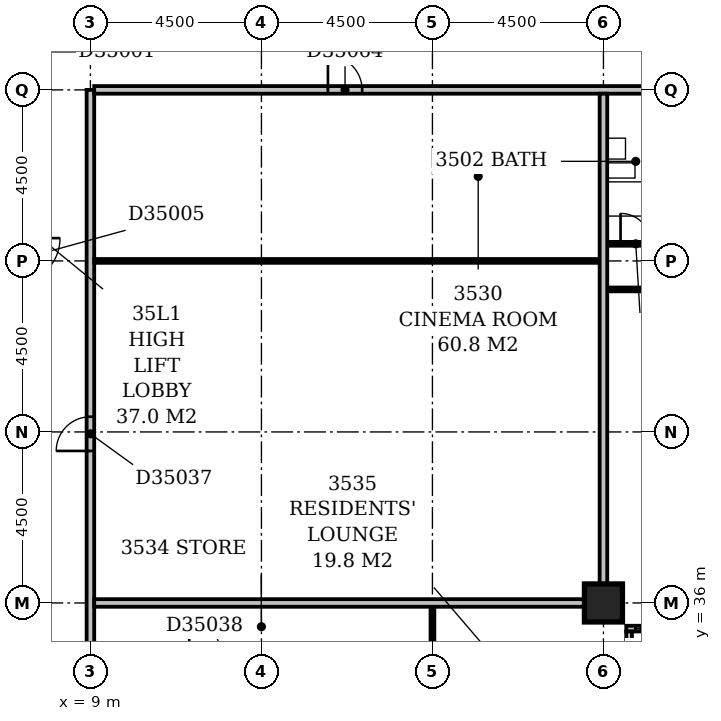
"""IFC4 building model, lengths in metres.
Left out: names, types, materials, properties, quantities, classifications, styles, units other than length and angle.
Written with IfcOpenShell. Run it as: python <this file> out.ifc"""

import sys

from ifc_helpers import new_model, si_unit, direction, frame, frame_2d, origin, origin_2d, place, context, subcontext, project, spatial, rectangle, extrude, element, fill, save


model = new_model("IFC4")
c1 = context("Model", 3, precision=1e-05, world=origin(), true_north=direction((0.0, 1.0)))
c2 = subcontext(c1, "Body", "Model", "MODEL_VIEW")
j1 = project(units=[si_unit("LENGTHUNIT", "METRE"), si_unit("PLANEANGLEUNIT", "RADIAN")], contexts=[c1])
p1 = place(None, origin())
s1 = spatial("IfcSite", under=j1, at=p1, CompositionType="ELEMENT")
p2 = place(p1, origin())
s2 = spatial("IfcBuilding", under=s1, at=p2, CompositionType="ELEMENT")
p3 = place(p2, frame((0.0, 0.0, 141.2)))
s3 = spatial("IfcBuildingStorey", under=s2, at=p3, CompositionType="ELEMENT", Elevation=141.2)
p4 = place(p3, frame((22.5, 36.0, -0.3), z_axis=(0.0, 0.0, 1.0), x_axis=(1.0, 0.0, 0.0)))
e1 = element("IfcColumn", 1, at=p4, inside=s3, PredefinedType="COLUMN", context=c2, shape_type="SweptSolid", body=[
    extrude(rectangle(XDim=1.0, YDim=1.0, at=origin_2d()), origin(), (0.0, 0.0, 1.0), 3.6),
])
p5 = place(p3, frame((23.175, 17.4, 0.0), z_axis=(0.0, 0.0, 1.0), x_axis=(0.0, 1.0, 0.0)))
e2 = element("IfcWall", 2, at=p5, inside=s3, PredefinedType="STANDARD", context=c2, shape_type="SweptSolid", body=[
    extrude(rectangle(XDim=17.85, YDim=0.15, at=frame_2d((8.925, 0.0))), origin(), (0.0, 0.0, 1.0), 2.7),
])
p6 = place(p5, frame((3.397, 0.0, 0.6)))
e3 = element("IfcOpeningElement", 3, at=p6, cuts=e2, PredefinedType="OPENING", context=c2, shape_type="SweptSolid", body=[
    extrude(rectangle(XDim=0.9, YDim=1.8, at=frame_2d((0.45, 0.9))), frame((0.0, 0.087, 0.0), z_axis=(0.0, -1.0, 0.0), x_axis=(1.0, 0.0, 0.0)), (0.0, 0.0, 1.0), 0.174),
])
p7 = place(p5, frame((6.15, 0.0, 0.6)))
e4 = element("IfcOpeningElement", 4, at=p7, cuts=e2, PredefinedType="OPENING", context=c2, shape_type="SweptSolid", body=[
    extrude(rectangle(XDim=2.4, YDim=1.8, at=frame_2d((1.2, 0.9))), frame((0.0, 0.087, 0.0), z_axis=(0.0, -1.0, 0.0), x_axis=(1.0, 0.0, 0.0)), (0.0, 0.0, 1.0), 0.174),
])
p8 = place(p5, frame((10.65, 0.0, 0.6)))
e5 = element("IfcOpeningElement", 5, at=p8, cuts=e2, PredefinedType="OPENING", context=c2, shape_type="SweptSolid", body=[
    extrude(rectangle(XDim=2.4, YDim=1.8, at=frame_2d((1.2, 0.9))), frame((0.0, 0.087, 0.0), z_axis=(0.0, -1.0, 0.0), x_axis=(1.0, 0.0, 0.0)), (0.0, 0.0, 1.0), 0.174),
])
p9 = place(p5, frame((15.15, 0.0, 0.6)))
e6 = element("IfcOpeningElement", 6, at=p9, cuts=e2, PredefinedType="OPENING", context=c2, shape_type="SweptSolid", body=[
    extrude(rectangle(XDim=2.4, YDim=1.8, at=frame_2d((1.2, 0.9))), frame((0.0, 0.087, 0.0), z_axis=(0.0, -1.0, 0.0), x_axis=(1.0, 0.0, 0.0)), (0.0, 0.0, 1.0), 0.174),
])
p10 = place(p3, frame((23.1, 35.325, 0.0), z_axis=(0.0, 0.0, 1.0), x_axis=(1.0, 0.0, 0.0)))
e7 = element("IfcWall", 7, at=p10, inside=s3, PredefinedType="STANDARD", context=c2, shape_type="SweptSolid", body=[
    extrude(rectangle(XDim=45.15, YDim=0.15, at=frame_2d((22.575, 0.0))), origin(), (0.0, 0.0, 1.0), 2.7),
])
p11 = place(p10, frame((0.24, 0.0, 0.6)))
e8 = element("IfcOpeningElement", 8, at=p11, cuts=e7, PredefinedType="OPENING", context=c2, shape_type="SweptSolid", body=[
    extrude(rectangle(XDim=0.45, YDim=1.8, at=frame_2d((0.225, 0.9))), frame((0.0, 0.087, 0.0), z_axis=(0.0, -1.0, 0.0), x_axis=(1.0, 0.0, 0.0)), (0.0, 0.0, 1.0), 0.174),
])
p12 = place(p10, frame((2.529, 0.0, 0.6)))
e9 = element("IfcOpeningElement", 9, at=p12, cuts=e7, PredefinedType="OPENING", context=c2, shape_type="SweptSolid", body=[
    extrude(rectangle(XDim=0.6, YDim=1.8, at=frame_2d((0.3, 0.9))), frame((0.0, 0.087, 0.0), z_axis=(0.0, -1.0, 0.0), x_axis=(1.0, 0.0, 0.0)), (0.0, 0.0, 1.0), 0.174),
])
p13 = place(p10, frame((4.95, 0.0, 0.6)))
e10 = element("IfcOpeningElement", 10, at=p13, cuts=e7, PredefinedType="OPENING", context=c2, shape_type="SweptSolid", body=[
    extrude(rectangle(XDim=2.4, YDim=1.8, at=frame_2d((1.2, 0.9))), frame((0.0, 0.087, 0.0), z_axis=(0.0, -1.0, 0.0), x_axis=(1.0, 0.0, 0.0)), (0.0, 0.0, 1.0), 0.174),
])
p14 = place(p10, frame((9.45, 0.0, 0.6)))
e11 = element("IfcOpeningElement", 11, at=p14, cuts=e7, PredefinedType="OPENING", context=c2, shape_type="SweptSolid", body=[
    extrude(rectangle(XDim=2.4, YDim=1.8, at=frame_2d((1.2, 0.9))), frame((0.0, 0.087, 0.0), z_axis=(0.0, -1.0, 0.0), x_axis=(1.0, 0.0, 0.0)), (0.0, 0.0, 1.0), 0.174),
])
p15 = place(p10, frame((13.95, 0.0, 0.6)))
e12 = element("IfcOpeningElement", 12, at=p15, cuts=e7, PredefinedType="OPENING", context=c2, shape_type="SweptSolid", body=[
    extrude(rectangle(XDim=2.4, YDim=1.8, at=frame_2d((1.2, 0.9))), frame((0.0, 0.087, 0.0), z_axis=(0.0, -1.0, 0.0), x_axis=(1.0, 0.0, 0.0)), (0.0, 0.0, 1.0), 0.174),
])
p16 = place(p10, frame((18.45, 0.0, 0.6)))
e13 = element("IfcOpeningElement", 13, at=p16, cuts=e7, PredefinedType="OPENING", context=c2, shape_type="SweptSolid", body=[
    extrude(rectangle(XDim=2.4, YDim=1.8, at=frame_2d((1.2, 0.9))), frame((0.0, 0.087, 0.0), z_axis=(0.0, -1.0, 0.0), x_axis=(1.0, 0.0, 0.0)), (0.0, 0.0, 1.0), 0.174),
])
p17 = place(p10, frame((22.653, 0.0, 0.6)))
e14 = element("IfcOpeningElement", 14, at=p17, cuts=e7, PredefinedType="OPENING", context=c2, shape_type="SweptSolid", body=[
    extrude(rectangle(XDim=1.5, YDim=1.8, at=frame_2d((0.75, 0.9))), frame((0.0, 0.087, 0.0), z_axis=(0.0, -1.0, 0.0), x_axis=(1.0, 0.0, 0.0)), (0.0, 0.0, 1.0), 0.174),
])
p18 = place(p10, frame((29.27, 0.0, 0.6)))
e15 = element("IfcOpeningElement", 15, at=p18, cuts=e7, PredefinedType="OPENING", context=c2, shape_type="SweptSolid", body=[
    extrude(rectangle(XDim=0.9, YDim=1.8, at=frame_2d((0.45, 0.9))), frame((0.0, 0.087, 0.0), z_axis=(0.0, -1.0, 0.0), x_axis=(1.0, 0.0, 0.0)), (0.0, 0.0, 1.0), 0.174),
])
p19 = place(p10, frame((31.95, 0.0, 0.6)))
e16 = element("IfcOpeningElement", 16, at=p19, cuts=e7, PredefinedType="OPENING", context=c2, shape_type="SweptSolid", body=[
    extrude(rectangle(XDim=2.4, YDim=1.8, at=frame_2d((1.2, 0.9))), frame((0.0, 0.087, 0.0), z_axis=(0.0, -1.0, 0.0), x_axis=(1.0, 0.0, 0.0)), (0.0, 0.0, 1.0), 0.174),
])
p20 = place(p10, frame((36.45, 0.0, 0.6)))
e17 = element("IfcOpeningElement", 17, at=p20, cuts=e7, PredefinedType="OPENING", context=c2, shape_type="SweptSolid", body=[
    extrude(rectangle(XDim=2.4, YDim=1.8, at=frame_2d((1.2, 0.9))), frame((0.0, 0.087, 0.0), z_axis=(0.0, -1.0, 0.0), x_axis=(1.0, 0.0, 0.0)), (0.0, 0.0, 1.0), 0.174),
])
p21 = place(p10, frame((40.95, 0.0, 0.6)))
e18 = element("IfcOpeningElement", 18, at=p21, cuts=e7, PredefinedType="OPENING", context=c2, shape_type="SweptSolid", body=[
    extrude(rectangle(XDim=2.4, YDim=1.8, at=frame_2d((1.2, 0.9))), frame((0.0, 0.087, 0.0), z_axis=(0.0, -1.0, 0.0), x_axis=(1.0, 0.0, 0.0)), (0.0, 0.0, 1.0), 0.174),
])
p22 = place(p3, frame((18.0, 31.6, 0.0), z_axis=(0.0, 0.0, 1.0), x_axis=(0.0, 1.0, 0.0)))
e19 = element("IfcWall", 19, at=p22, inside=s3, PredefinedType="PARTITIONING", context=c2, shape_type="SweptSolid", body=[
    extrude(rectangle(XDim=4.3, YDim=0.1, at=frame_2d((2.15, 0.0))), origin(), (0.0, 0.0, 1.0), 3.3),
])
p23 = place(p22, frame((1.7, 0.0, 0.0)))
e20 = element("IfcOpeningElement", 20, at=p23, cuts=e19, PredefinedType="OPENING", context=c2, shape_type="SweptSolid", body=[
    extrude(rectangle(XDim=0.9, YDim=2.1, at=frame_2d((0.45, 1.05))), frame((0.0, 0.062, 0.0), z_axis=(0.0, -1.0, 0.0), x_axis=(1.0, 0.0, 0.0)), (0.0, 0.0, 1.0), 0.124),
])
p24 = place(p3, frame((9.0, 34.75, 0.0), z_axis=(0.0, 0.0, 1.0), x_axis=(0.0, 1.0, 0.0)))
e21 = element("IfcWall", 21, at=p24, inside=s3, PredefinedType="PARTITIONING", context=c2, shape_type="SweptSolid", body=[
    extrude(rectangle(XDim=14.75, YDim=0.2, at=frame_2d((7.375, 0.0))), origin(), (0.0, 0.0, 1.0), 3.3),
])
p25 = place(p24, frame((5.25, 0.0, 0.0)))
e22 = element("IfcOpeningElement", 22, at=p25, cuts=e21, PredefinedType="OPENING", context=c2, shape_type="SweptSolid", body=[
    extrude(rectangle(XDim=0.9, YDim=2.1, at=frame_2d((0.45, 1.05))), frame((0.0, 0.112, 0.0), z_axis=(0.0, -1.0, 0.0), x_axis=(1.0, 0.0, 0.0)), (0.0, 0.0, 1.0), 0.224),
])
for number, where, z_axis, x_axis in (
    (23, (9.1, 36.0, 0.0), (0.0, 0.0, 1.0), (1.0, 0.0, 0.0)),
    (24, (22.5, 36.5, 0.0), (0.0, 0.0, 1.0), (0.0, 1.0, 0.0)),
):
    element("IfcWall", number, at=place(p3, frame(where, z_axis=z_axis, x_axis=x_axis)), inside=s3, PredefinedType="PARTITIONING", context=c2, shape_type="SweptSolid", body=[
        extrude(rectangle(XDim=12.9, YDim=0.2, at=frame_2d((6.45, 0.0))), origin(), (0.0, 0.0, 1.0), 3.3),
    ])
p26 = place(p3, frame((22.6, 44.25, 0.0), z_axis=(0.0, 0.0, 1.0), x_axis=(1.0, 0.0, 0.0)))
e25 = element("IfcWall", 25, at=p26, inside=s3, PredefinedType="PARTITIONING", context=c2, shape_type="SweptSolid", body=[
    extrude(rectangle(XDim=4.3, YDim=0.1, at=frame_2d((2.15, 0.0))), origin(), (0.0, 0.0, 1.0), 3.3),
])
p27 = place(p26, frame((1.7, 0.0, 0.0)))
e26 = element("IfcOpeningElement", 26, at=p27, cuts=e25, PredefinedType="OPENING", context=c2, shape_type="SweptSolid", body=[
    extrude(rectangle(XDim=0.9, YDim=2.1, at=frame_2d((0.45, 1.05))), frame((0.0, 0.062, 0.0), z_axis=(0.0, -1.0, 0.0), x_axis=(1.0, 0.0, 0.0)), (0.0, 0.0, 1.0), 0.124),
])
p28 = place(p3, frame((9.1, 45.0, 0.0), z_axis=(0.0, 0.0, 1.0), x_axis=(1.0, 0.0, 0.0)))
e27 = element("IfcWall", 27, at=p28, inside=s3, PredefinedType="PARTITIONING", context=c2, shape_type="SweptSolid", body=[
    extrude(rectangle(XDim=13.3, YDim=0.1, at=frame_2d((6.65, 0.0))), origin(), (0.0, 0.0, 1.0), 3.3),
])
p29 = place(p3, frame((22.6, 45.45, 0.0), z_axis=(0.0, 0.0, 1.0), x_axis=(1.0, 0.0, 0.0)))
e28 = element("IfcWall", 28, at=p29, inside=s3, PredefinedType="PARTITIONING", context=c2, shape_type="SweptSolid", body=[
    extrude(rectangle(XDim=1.55, YDim=0.1, at=frame_2d((0.775, 0.0))), origin(), (0.0, 0.0, 1.0), 3.3),
])
p30 = place(p29, frame((0.35, 0.0, 0.0)))
e29 = element("IfcOpeningElement", 29, at=p30, cuts=e28, PredefinedType="OPENING", context=c2, shape_type="SweptSolid", body=[
    extrude(rectangle(XDim=0.8, YDim=2.1, at=frame_2d((0.4, 1.05))), frame((0.0, 0.062, 0.0), z_axis=(0.0, -1.0, 0.0), x_axis=(1.0, 0.0, 0.0)), (0.0, 0.0, 1.0), 0.124),
])
p31 = place(p3, frame((9.1, 49.5, 0.0), z_axis=(0.0, 0.0, 1.0), x_axis=(1.0, 0.0, 0.0)))
e30 = element("IfcWall", 30, at=p31, inside=s3, PredefinedType="PARTITIONING", context=c2, shape_type="SweptSolid", body=[
    extrude(rectangle(XDim=19.05, YDim=0.2, at=frame_2d((9.525, 0.0))), origin(), (0.0, 0.0, 1.0), 3.3),
])
p32 = place(p31, frame((15.35, 0.0, 0.0)))
e31 = element("IfcOpeningElement", 31, at=p32, cuts=e30, PredefinedType="OPENING", context=c2, shape_type="SweptSolid", body=[
    extrude(rectangle(XDim=1.0, YDim=2.1, at=frame_2d((0.5, 1.05))), frame((0.0, 0.112, 0.0), z_axis=(0.0, -1.0, 0.0), x_axis=(1.0, 0.0, 0.0)), (0.0, 0.0, 1.0), 0.224),
])
p33 = place(p31, frame((6.15, 0.0, 0.0)))
e32 = element("IfcOpeningElement", 32, at=p33, cuts=e30, PredefinedType="OPENING", context=c2, shape_type="SweptSolid", body=[
    extrude(rectangle(XDim=0.9, YDim=2.1, at=frame_2d((0.45, 1.05))), frame((0.0, 0.112, 0.0), z_axis=(0.0, -1.0, 0.0), x_axis=(1.0, 0.0, 0.0)), (0.0, 0.0, 1.0), 0.224),
])
p34 = place(p11, origin())
e33 = element("IfcWindow", 33, at=p34, inside=s3, PartitioningType="SINGLE_PANEL", PredefinedType="WINDOW", context=c2, shape_type="SweptSolid", body=[
    extrude(rectangle(XDim=0.45, YDim=1.8, at=frame_2d((0.225, 0.9))), frame((0.0, 0.03, 0.0), z_axis=(0.0, -1.0, 0.0), x_axis=(1.0, 0.0, 0.0)), (0.0, 0.0, 1.0), 0.06),
])
fill(e8, e33)
p35 = place(p25, origin())
e34 = element("IfcDoor", 34, at=p35, inside=s3, OperationType="SINGLE_SWING_LEFT", PredefinedType="DOOR", context=c2, shape_type="SweptSolid", body=[
    extrude(rectangle(XDim=0.9, YDim=2.1, at=frame_2d((0.45, 1.05))), frame((0.0, 0.025, 0.0), z_axis=(0.0, -1.0, 0.0), x_axis=(1.0, 0.0, 0.0)), (0.0, 0.0, 1.0), 0.05),
])
fill(e22, e34)
p36 = place(p30, origin())
e35 = element("IfcDoor", 35, at=p36, inside=s3, OperationType="SINGLE_SWING_LEFT", PredefinedType="DOOR", context=c2, shape_type="SweptSolid", body=[
    extrude(rectangle(XDim=0.8, YDim=2.1, at=frame_2d((0.4, 1.05))), frame((0.0, 0.025, 0.0), z_axis=(0.0, -1.0, 0.0), x_axis=(1.0, 0.0, 0.0)), (0.0, 0.0, 1.0), 0.05),
])
fill(e29, e35)
p37 = place(p33, origin())
e36 = element("IfcDoor", 36, at=p37, inside=s3, OperationType="SINGLE_SWING_LEFT", PredefinedType="DOOR", context=c2, shape_type="SweptSolid", body=[
    extrude(rectangle(XDim=0.9, YDim=2.1, at=frame_2d((0.45, 1.05))), frame((0.0, 0.025, 0.0), z_axis=(0.0, -1.0, 0.0), x_axis=(1.0, 0.0, 0.0)), (0.0, 0.0, 1.0), 0.05),
])
fill(e32, e36)
save(model, sys.argv[1])
